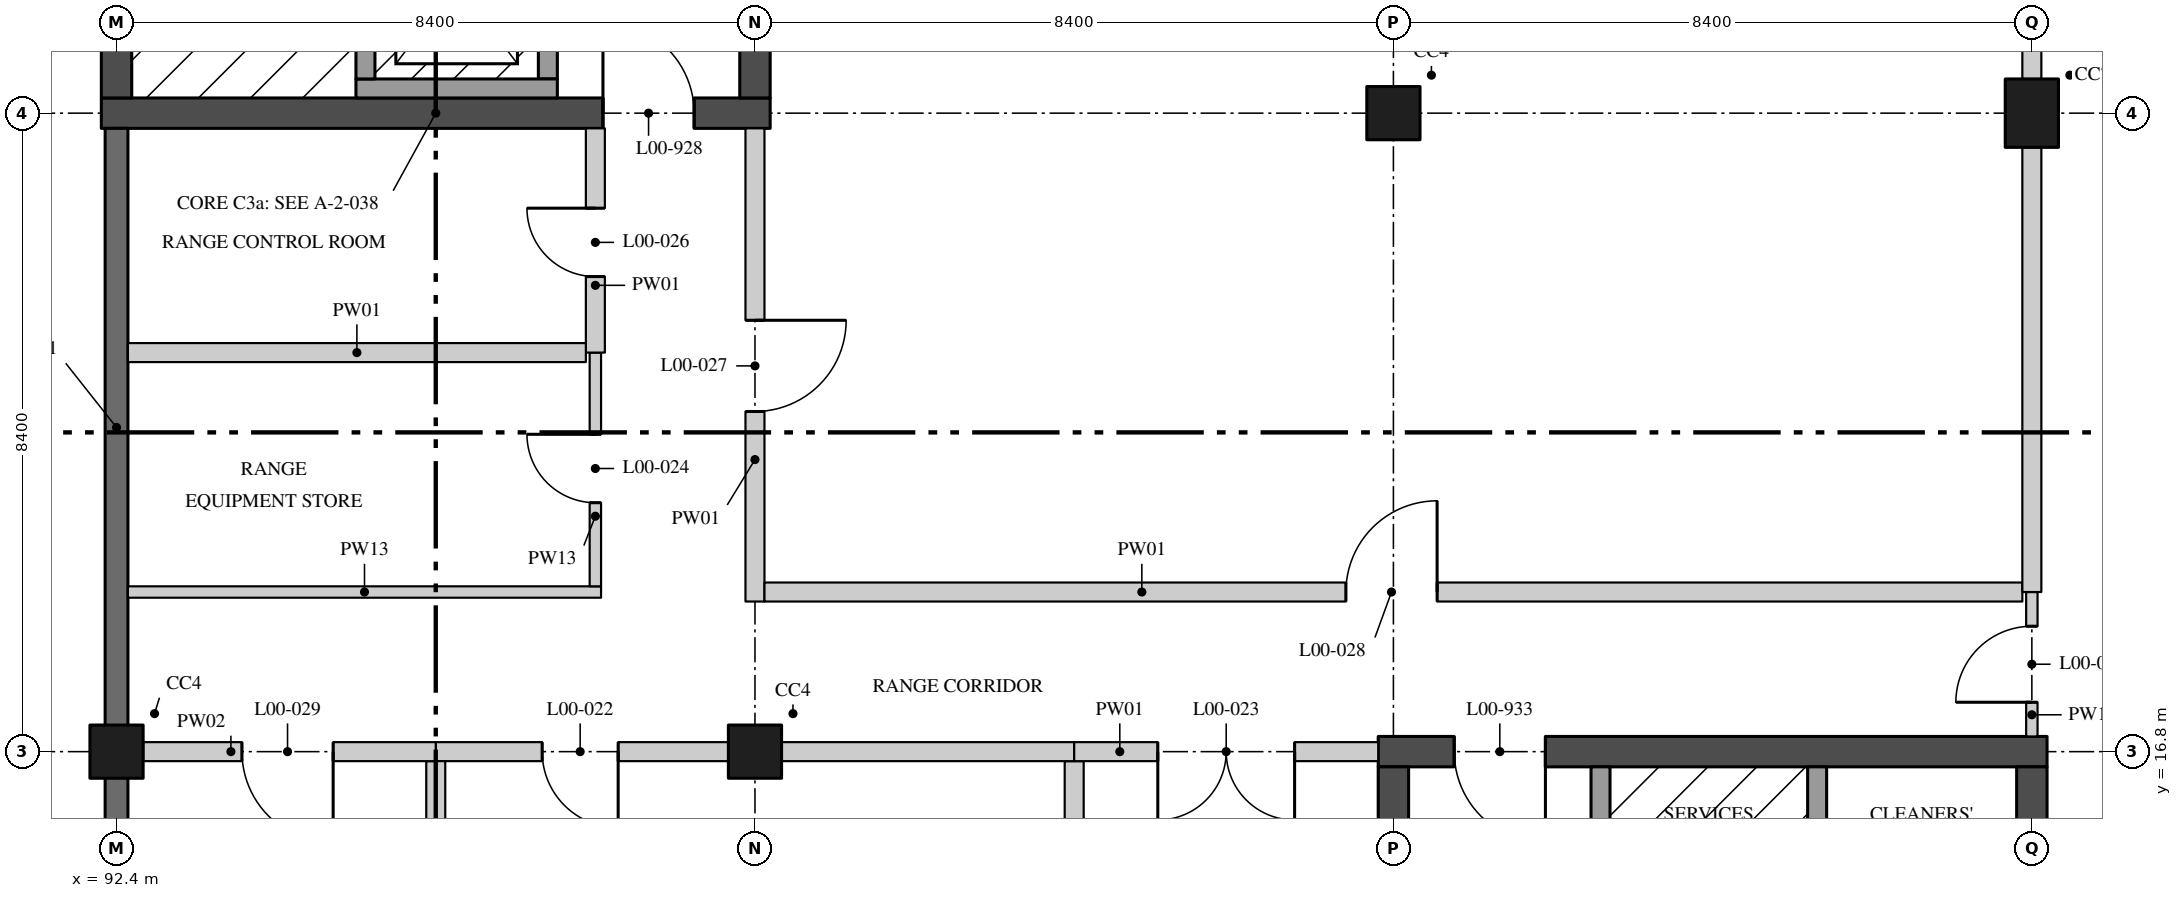
"""IFC4 building model, lengths in metres.
Left out: names, types, materials, properties, quantities, classifications, styles, units other than length and angle.
Written with IfcOpenShell. Run it as: python <this file> out.ifc"""

import sys

from ifc_helpers import new_model, si_unit, direction, frame, frame_2d, origin, origin_2d, place, context, subcontext, project, spatial, rectangle, extrude, element, fill, save


model = new_model("IFC4")
c1 = context("Model", 3, precision=1e-05, world=origin(), true_north=direction((0.0, 1.0)))
c2 = subcontext(c1, "Body", "Model", "MODEL_VIEW")
j1 = project(units=[si_unit("LENGTHUNIT", "METRE"), si_unit("PLANEANGLEUNIT", "RADIAN")], contexts=[c1])
p1 = place(None, origin())
s1 = spatial("IfcSite", under=j1, at=p1, CompositionType="ELEMENT")
p2 = place(p1, origin())
s2 = spatial("IfcBuilding", under=s1, at=p2, CompositionType="ELEMENT")
p3 = place(p2, origin())
s3 = spatial("IfcBuildingStorey", under=s2, at=p3, CompositionType="ELEMENT", Elevation=0.0)
for number, where, z_axis, x_axis in (
    (1, (92.4, 16.8, 0.0), (0.0, 0.0, 1.0), (1.0, 0.0, 0.0)),
    (2, (100.8, 16.8, 0.0), (0.0, 0.0, 1.0), (1.0, 0.0, 0.0)),
    (3, (109.2, 25.2, 0.0), (0.0, 0.0, 1.0), (1.0, 0.0, 0.0)),
):
    element("IfcColumn", number, at=place(p3, frame(where, z_axis=z_axis, x_axis=x_axis)), inside=s3, PredefinedType="COLUMN", context=c2, shape_type="SweptSolid", body=[
        extrude(rectangle(XDim=0.7, YDim=0.7, at=origin_2d()), origin(), (0.0, 0.0, 1.0), 5.05),
    ])
p4 = place(p3, frame((117.6, 25.2, 0.0), z_axis=(0.0, 0.0, 1.0), x_axis=(1.0, 0.0, 0.0)))
e4 = element("IfcColumn", 4, at=p4, inside=s3, PredefinedType="COLUMN", context=c2, shape_type="SweptSolid", body=[
    extrude(rectangle(XDim=0.7, YDim=0.9, at=origin_2d()), origin(), (0.0, 0.0, 1.0), 5.05),
])
p5 = place(p3, frame((92.2, 25.2, 0.0), z_axis=(0.0, 0.0, 1.0), x_axis=(1.0, 0.0, 0.0)))
e5 = element("IfcWall", 5, at=p5, inside=s3, PredefinedType="SHEAR", context=c2, shape_type="SweptSolid", body=[
    extrude(rectangle(XDim=8.8, YDim=0.4, at=frame_2d((4.4, 0.0))), origin(), (0.0, 0.0, 1.0), 5.05),
])
p6 = place(p5, frame((6.6, 0.0, 0.0)))
e6 = element("IfcOpeningElement", 6, at=p6, cuts=e5, PredefinedType="OPENING", context=c2, shape_type="SweptSolid", body=[
    extrude(rectangle(XDim=1.2, YDim=2.1, at=frame_2d((0.6, 1.05))), frame((0.0, 0.21, 0.0), z_axis=(0.0, -1.0, 0.0), x_axis=(1.0, 0.0, 0.0)), (0.0, 0.0, 1.0), 0.42),
])
for number, where, z_axis, x_axis in (
    (7, (92.4, 25.4, 0.0), (0.0, 0.0, 1.0), (0.0, 1.0, 0.0)),
    (8, (100.8, 25.4, 0.0), (0.0, 0.0, 1.0), (0.0, 1.0, 0.0)),
):
    element("IfcWall", number, at=place(p3, frame(where, z_axis=z_axis, x_axis=x_axis)), inside=s3, PredefinedType="SHEAR", context=c2, shape_type="SweptSolid", body=[
        extrude(rectangle(XDim=8.0, YDim=0.4, at=frame_2d((4.0, 0.0))), origin(), (0.0, 0.0, 1.0), 5.05),
    ])
p7 = place(p3, frame((109.0, 16.8, 0.0), z_axis=(0.0, 0.0, 1.0), x_axis=(1.0, 0.0, 0.0)))
e9 = element("IfcWall", 9, at=p7, inside=s3, PredefinedType="SHEAR", context=c2, shape_type="SweptSolid", body=[
    extrude(rectangle(XDim=8.8, YDim=0.4, at=frame_2d((4.4, 0.0))), origin(), (0.0, 0.0, 1.0), 5.05),
])
p8 = place(p7, frame((1.0, 0.0, 0.0)))
e10 = element("IfcOpeningElement", 10, at=p8, cuts=e9, PredefinedType="OPENING", context=c2, shape_type="SweptSolid", body=[
    extrude(rectangle(XDim=1.2, YDim=2.1, at=frame_2d((0.6, 1.05))), frame((0.0, 0.21, 0.0), z_axis=(0.0, -1.0, 0.0), x_axis=(1.0, 0.0, 0.0)), (0.0, 0.0, 1.0), 0.42),
])
for number, where, z_axis, x_axis in (
    (11, (109.2, 8.6, 0.0), (0.0, 0.0, 1.0), (0.0, 1.0, 0.0)),
    (12, (117.6, 8.6, 0.0), (0.0, 0.0, 1.0), (0.0, 1.0, 0.0)),
):
    element("IfcWall", number, at=place(p3, frame(where, z_axis=z_axis, x_axis=x_axis)), inside=s3, PredefinedType="SHEAR", context=c2, shape_type="SweptSolid", body=[
        extrude(rectangle(XDim=8.0, YDim=0.4, at=frame_2d((4.0, 0.0))), origin(), (0.0, 0.0, 1.0), 5.05),
    ])
p9 = place(p3, frame((111.925, 13.8, 0.0), z_axis=(0.0, 0.0, 1.0), x_axis=(0.0, 1.0, 0.0)))
e13 = element("IfcWall", 13, at=p9, inside=s3, PredefinedType="SOLIDWALL", context=c2, shape_type="SweptSolid", body=[
    extrude(rectangle(XDim=2.8, YDim=0.25, at=frame_2d((1.4, 0.0))), origin(), (0.0, 0.0, 1.0), 5.05),
])
p10 = place(p3, frame((114.775, 14.05, 0.0), z_axis=(0.0, 0.0, 1.0), x_axis=(0.0, 1.0, 0.0)))
e14 = element("IfcWall", 14, at=p10, inside=s3, PredefinedType="SOLIDWALL", context=c2, shape_type="SweptSolid", body=[
    extrude(rectangle(XDim=2.55, YDim=0.25, at=frame_2d((1.275, 0.0))), origin(), (0.0, 0.0, 1.0), 5.05),
])
p11 = place(p3, frame((98.075, 25.65, 0.0), z_axis=(0.0, 0.0, 1.0), x_axis=(0.0, 1.0, 0.0)))
e15 = element("IfcWall", 15, at=p11, inside=s3, PredefinedType="SOLIDWALL", context=c2, shape_type="SweptSolid", body=[
    extrude(rectangle(XDim=2.3, YDim=0.25, at=frame_2d((1.15, 0.0))), origin(), (0.0, 0.0, 1.0), 5.05),
])
p12 = place(p3, frame((95.55, 25.525, 0.0), z_axis=(0.0, 0.0, 1.0), x_axis=(1.0, 0.0, 0.0)))
e16 = element("IfcWall", 16, at=p12, inside=s3, PredefinedType="SOLIDWALL", context=c2, shape_type="SweptSolid", body=[
    extrude(rectangle(XDim=2.65, YDim=0.25, at=frame_2d((1.325, 0.0))), origin(), (0.0, 0.0, 1.0), 5.05),
])
p13 = place(p3, frame((95.675, 25.65, 0.0), z_axis=(0.0, 0.0, 1.0), x_axis=(0.0, 1.0, 0.0)))
e17 = element("IfcWall", 17, at=p13, inside=s3, PredefinedType="SOLIDWALL", context=c2, shape_type="SweptSolid", body=[
    extrude(rectangle(XDim=2.3, YDim=0.25, at=frame_2d((1.15, 0.0))), origin(), (0.0, 0.0, 1.0), 5.05),
])
p14 = place(p3, frame((105.0, 8.55, 0.0), z_axis=(0.0, 0.0, 1.0), x_axis=(0.0, 1.0, 0.0)))
e18 = element("IfcWall", 18, at=p14, inside=s3, PredefinedType="PARTITIONING", context=c2, shape_type="SweptSolid", body=[
    extrude(rectangle(XDim=8.125, YDim=0.25, at=frame_2d((4.062, 0.0))), origin(), (0.0, 0.0, 1.0), 5.05),
])
p15 = place(p3, frame((96.6, 16.8, 0.0), z_axis=(0.0, 0.0, 1.0), x_axis=(1.0, 0.0, 0.0)))
e19 = element("IfcWall", 19, at=p15, inside=s3, PredefinedType="PARTITIONING", context=c2, shape_type="SweptSolid", body=[
    extrude(rectangle(XDim=3.85, YDim=0.25, at=frame_2d((1.925, 0.0))), origin(), (0.0, 0.0, 1.0), 5.05),
])
p16 = place(p15, frame((1.4, 0.0, 0.0)))
e20 = element("IfcOpeningElement", 20, at=p16, cuts=e19, PredefinedType="OPENING", context=c2, shape_type="SweptSolid", body=[
    extrude(rectangle(XDim=1.0, YDim=2.1, at=frame_2d((0.5, 1.05))), frame((0.0, 0.135, 0.0), z_axis=(0.0, -1.0, 0.0), x_axis=(1.0, 0.0, 0.0)), (0.0, 0.0, 1.0), 0.27),
])
p17 = place(p3, frame((101.15, 16.8, 0.0), z_axis=(0.0, 0.0, 1.0), x_axis=(1.0, 0.0, 0.0)))
e21 = element("IfcWall", 21, at=p17, inside=s3, PredefinedType="PARTITIONING", context=c2, shape_type="SweptSolid", body=[
    extrude(rectangle(XDim=3.85, YDim=0.25, at=frame_2d((1.925, 0.0))), origin(), (0.0, 0.0, 1.0), 5.05),
])
p18 = place(p3, frame((96.6, 8.55, 0.0), z_axis=(0.0, 0.0, 1.0), x_axis=(0.0, 1.0, 0.0)))
e22 = element("IfcWall", 22, at=p18, inside=s3, PredefinedType="PARTITIONING", context=c2, shape_type="SweptSolid", body=[
    extrude(rectangle(XDim=8.125, YDim=0.25, at=frame_2d((4.062, 0.0))), origin(), (0.0, 0.0, 1.0), 5.05),
])
p19 = place(p3, frame((105.0, 16.8, 0.0), z_axis=(0.0, 0.0, 1.0), x_axis=(1.0, 0.0, 0.0)))
e23 = element("IfcWall", 23, at=p19, inside=s3, PredefinedType="PARTITIONING", context=c2, shape_type="SweptSolid", body=[
    extrude(rectangle(XDim=4.0, YDim=0.25, at=frame_2d((2.0, 0.0))), origin(), (0.0, 0.0, 1.0), 5.05),
])
p20 = place(p19, frame((1.1, 0.0, 0.0)))
e24 = element("IfcOpeningElement", 24, at=p20, cuts=e23, PredefinedType="OPENING", context=c2, shape_type="SweptSolid", body=[
    extrude(rectangle(XDim=1.8, YDim=2.7, at=frame_2d((0.9, 1.35))), frame((0.0, 0.135, 0.0), z_axis=(0.0, -1.0, 0.0), x_axis=(1.0, 0.0, 0.0)), (0.0, 0.0, 1.0), 0.27),
])
p21 = place(p3, frame((92.55, 18.9, 0.0), z_axis=(0.0, 0.0, 1.0), x_axis=(1.0, 0.0, 0.0)))
e25 = element("IfcWall", 25, at=p21, inside=s3, PredefinedType="PARTITIONING", context=c2, shape_type="SweptSolid", body=[
    extrude(rectangle(XDim=6.225, YDim=0.15, at=frame_2d((3.112, 0.0))), origin(), (0.0, 0.0, 1.0), 5.05),
])
p22 = place(p3, frame((98.7, 18.975, 0.0), z_axis=(0.0, 0.0, 1.0), x_axis=(0.0, 1.0, 0.0)))
e26 = element("IfcWall", 26, at=p22, inside=s3, PredefinedType="PARTITIONING", context=c2, shape_type="SweptSolid", body=[
    extrude(rectangle(XDim=3.075, YDim=0.15, at=frame_2d((1.538, 0.0))), origin(), (0.0, 0.0, 1.0), 5.05),
])
p23 = place(p22, frame((1.1, 0.0, 0.0)))
e27 = element("IfcOpeningElement", 27, at=p23, cuts=e26, PredefinedType="OPENING", context=c2, shape_type="SweptSolid", body=[
    extrude(rectangle(XDim=0.9, YDim=2.1, at=frame_2d((0.45, 1.05))), frame((0.0, 0.085, 0.0), z_axis=(0.0, -1.0, 0.0), x_axis=(1.0, 0.0, 0.0)), (0.0, 0.0, 1.0), 0.17),
])
p24 = place(p3, frame((117.6, 17.0, 0.0), z_axis=(0.0, 0.0, 1.0), x_axis=(0.0, 1.0, 0.0)))
e28 = element("IfcWall", 28, at=p24, inside=s3, PredefinedType="PARTITIONING", context=c2, shape_type="SweptSolid", body=[
    extrude(rectangle(XDim=1.9, YDim=0.15, at=frame_2d((0.95, 0.0))), origin(), (0.0, 0.0, 1.0), 8.375),
])
p25 = place(p24, frame((0.45, 0.0, 0.0)))
e29 = element("IfcOpeningElement", 29, at=p25, cuts=e28, PredefinedType="OPENING", context=c2, shape_type="SweptSolid", body=[
    extrude(rectangle(XDim=1.0, YDim=2.1, at=frame_2d((0.5, 1.05))), frame((0.0, 0.085, 0.0), z_axis=(0.0, -1.0, 0.0), x_axis=(1.0, 0.0, 0.0)), (0.0, 0.0, 1.0), 0.17),
])
p26 = place(p3, frame((98.7, 22.05, 0.0), z_axis=(0.0, 0.0, 1.0), x_axis=(0.0, 1.0, 0.0)))
e30 = element("IfcWall", 30, at=p26, inside=s3, PredefinedType="PARTITIONING", context=c2, shape_type="SweptSolid", body=[
    extrude(rectangle(XDim=2.95, YDim=0.25, at=frame_2d((1.475, 0.0))), origin(), (0.0, 0.0, 1.0), 5.05),
])
p27 = place(p26, frame((1.0, 0.0, 0.0)))
e31 = element("IfcOpeningElement", 31, at=p27, cuts=e30, PredefinedType="OPENING", context=c2, shape_type="SweptSolid", body=[
    extrude(rectangle(XDim=0.9, YDim=2.1, at=frame_2d((0.45, 1.05))), frame((0.0, 0.135, 0.0), z_axis=(0.0, -1.0, 0.0), x_axis=(1.0, 0.0, 0.0)), (0.0, 0.0, 1.0), 0.27),
])
p28 = place(p3, frame((100.8, 18.775, 0.0), z_axis=(0.0, 0.0, 1.0), x_axis=(0.0, 1.0, 0.0)))
e32 = element("IfcWall", 32, at=p28, inside=s3, PredefinedType="PARTITIONING", context=c2, shape_type="SweptSolid", body=[
    extrude(rectangle(XDim=6.225, YDim=0.25, at=frame_2d((3.113, 0.0))), origin(), (0.0, 0.0, 1.0), 5.05),
])
p29 = place(p28, frame((2.5, 0.0, 0.0)))
e33 = element("IfcOpeningElement", 33, at=p29, cuts=e32, PredefinedType="OPENING", context=c2, shape_type="SweptSolid", body=[
    extrude(rectangle(XDim=1.2, YDim=2.1, at=frame_2d((0.6, 1.05))), frame((0.0, 0.135, 0.0), z_axis=(0.0, -1.0, 0.0), x_axis=(1.0, 0.0, 0.0)), (0.0, 0.0, 1.0), 0.27),
])
p30 = place(p3, frame((100.925, 18.9, 0.0), z_axis=(0.0, 0.0, 1.0), x_axis=(1.0, 0.0, 0.0)))
e34 = element("IfcWall", 34, at=p30, inside=s3, PredefinedType="PARTITIONING", context=c2, shape_type="SweptSolid", body=[
    extrude(rectangle(XDim=16.55, YDim=0.25, at=frame_2d((8.275, 0.0))), origin(), (0.0, 0.0, 1.0), 5.05),
])
p31 = place(p30, frame((7.65, 0.0, 0.0)))
e35 = element("IfcOpeningElement", 35, at=p31, cuts=e34, PredefinedType="OPENING", context=c2, shape_type="SweptSolid", body=[
    extrude(rectangle(XDim=1.2, YDim=2.1, at=frame_2d((0.6, 1.05))), frame((0.0, 0.135, 0.0), z_axis=(0.0, -1.0, 0.0), x_axis=(1.0, 0.0, 0.0)), (0.0, 0.0, 1.0), 0.27),
])
p32 = place(p3, frame((92.75, 16.8, 0.0), z_axis=(0.0, 0.0, 1.0), x_axis=(1.0, 0.0, 0.0)))
e36 = element("IfcWall", 36, at=p32, inside=s3, PredefinedType="PARTITIONING", context=c2, shape_type="SweptSolid", body=[
    extrude(rectangle(XDim=3.85, YDim=0.25, at=frame_2d((1.925, 0.0))), origin(), (0.0, 0.0, 1.0), 5.05),
])
p33 = place(p32, frame((1.3, 0.0, 0.0)))
e37 = element("IfcOpeningElement", 37, at=p33, cuts=e36, PredefinedType="OPENING", context=c2, shape_type="SweptSolid", body=[
    extrude(rectangle(XDim=1.2, YDim=2.4, at=frame_2d((0.6, 1.2))), frame((0.0, 0.135, 0.0), z_axis=(0.0, -1.0, 0.0), x_axis=(1.0, 0.0, 0.0)), (0.0, 0.0, 1.0), 0.27),
])
p34 = place(p3, frame((92.55, 22.05, 0.0), z_axis=(0.0, 0.0, 1.0), x_axis=(1.0, 0.0, 0.0)))
e38 = element("IfcWall", 38, at=p34, inside=s3, PredefinedType="PARTITIONING", context=c2, shape_type="SweptSolid", body=[
    extrude(rectangle(XDim=6.025, YDim=0.25, at=frame_2d((3.012, 0.0))), origin(), (0.0, 0.0, 1.0), 5.05),
])
p35 = place(p3, frame((117.6, 18.9, 0.0), z_axis=(0.0, 0.0, 1.0), x_axis=(0.0, 1.0, 0.0)))
e39 = element("IfcWall", 39, at=p35, inside=s3, PredefinedType="PARTITIONING", context=c2, shape_type="SweptSolid", body=[
    extrude(rectangle(XDim=5.85, YDim=0.25, at=frame_2d((2.925, 0.0))), origin(), (0.0, 0.0, 1.0), 8.375),
])
p36 = place(p3, frame((117.6, 25.65, 0.0), z_axis=(0.0, 0.0, 1.0), x_axis=(0.0, 1.0, 0.0)))
e40 = element("IfcWall", 40, at=p36, inside=s3, PredefinedType="PARTITIONING", context=c2, shape_type="SweptSolid", body=[
    extrude(rectangle(XDim=7.75, YDim=0.25, at=frame_2d((3.875, 0.0))), origin(), (0.0, 0.0, 1.0), 8.375),
])
p37 = place(p3, frame((92.4, 25.0, 0.0), z_axis=(0.0, 0.0, 1.0), x_axis=(0.0, -1.0, 0.0)))
e41 = element("IfcWall", 41, at=p37, inside=s3, PredefinedType="SOLIDWALL", context=c2, shape_type="SweptSolid", body=[
    extrude(rectangle(XDim=7.87, YDim=0.3, at=frame_2d((3.935, 0.0))), origin(), (0.0, 0.0, 1.0), 5.05),
])
p38 = place(p3, frame((92.4, 16.47, 0.0), z_axis=(0.0, 0.0, 1.0), x_axis=(0.0, -1.0, 0.0)))
e42 = element("IfcWall", 42, at=p38, inside=s3, PredefinedType="SOLIDWALL", context=c2, shape_type="SweptSolid", body=[
    extrude(rectangle(XDim=7.74, YDim=0.3, at=frame_2d((3.87, 0.0))), origin(), (0.0, 0.0, 1.0), 5.05),
])
p39 = place(p38, frame((0.57, 0.0, 0.6)))
e43 = element("IfcOpeningElement", 43, at=p39, cuts=e42, PredefinedType="OPENING", context=c2, shape_type="SweptSolid", body=[
    extrude(rectangle(XDim=2.4, YDim=2.1, at=frame_2d((1.2, 1.05))), frame((0.0, 0.16, 0.0), z_axis=(0.0, -1.0, 0.0), x_axis=(1.0, 0.0, 0.0)), (0.0, 0.0, 1.0), 0.32),
])
p40 = place(p6, origin())
e44 = element("IfcDoor", 44, at=p40, inside=s3, OperationType="SINGLE_SWING_RIGHT", PredefinedType="DOOR", context=c2, shape_type="SweptSolid", body=[
    extrude(rectangle(XDim=1.2, YDim=2.1, at=frame_2d((0.6, 1.05))), frame((0.0, 0.035, 0.0), z_axis=(0.0, -1.0, 0.0), x_axis=(1.0, 0.0, 0.0)), (0.0, 0.0, 1.0), 0.07),
])
fill(e6, e44)
p41 = place(p8, frame((1.2, 0.0, 0.0), z_axis=(0.0, 0.0, 1.0), x_axis=(-1.0, 0.0, 0.0)))
e45 = element("IfcDoor", 45, at=p41, inside=s3, OperationType="SINGLE_SWING_RIGHT", PredefinedType="DOOR", context=c2, shape_type="SweptSolid", body=[
    extrude(rectangle(XDim=1.2, YDim=2.1, at=frame_2d((0.6, 1.05))), frame((0.0, 0.035, 0.0), z_axis=(0.0, -1.0, 0.0), x_axis=(1.0, 0.0, 0.0)), (0.0, 0.0, 1.0), 0.07),
])
fill(e10, e45)
p42 = place(p16, frame((1.0, 0.0, 0.0), z_axis=(0.0, 0.0, 1.0), x_axis=(-1.0, 0.0, 0.0)))
e46 = element("IfcDoor", 46, at=p42, inside=s3, OperationType="SINGLE_SWING_RIGHT", PredefinedType="DOOR", context=c2, shape_type="SweptSolid", body=[
    extrude(rectangle(XDim=1.0, YDim=2.1, at=frame_2d((0.5, 1.05))), frame((0.0, 0.06, 0.0), z_axis=(0.0, -1.0, 0.0), x_axis=(1.0, 0.0, 0.0)), (0.0, 0.0, 1.0), 0.12),
])
fill(e20, e46)
p43 = place(p20, frame((1.8, 0.0, 0.0), z_axis=(0.0, 0.0, 1.0), x_axis=(-1.0, 0.0, 0.0)))
e47 = element("IfcDoor", 47, at=p43, inside=s3, OperationType="DOUBLE_DOOR_SINGLE_SWING", PredefinedType="DOOR", context=c2, shape_type="SweptSolid", body=[
    extrude(rectangle(XDim=1.8, YDim=2.7, at=frame_2d((0.9, 1.35))), frame((0.0, 0.05, 0.0), z_axis=(0.0, -1.0, 0.0), x_axis=(1.0, 0.0, 0.0)), (0.0, 0.0, 1.0), 0.1),
])
fill(e24, e47)
p44 = place(p23, origin())
e48 = element("IfcDoor", 48, at=p44, inside=s3, OperationType="SINGLE_SWING_LEFT", PredefinedType="DOOR", context=c2, shape_type="SweptSolid", body=[
    extrude(rectangle(XDim=0.9, YDim=2.1, at=frame_2d((0.45, 1.05))), frame((0.0, 0.025, 0.0), z_axis=(0.0, -1.0, 0.0), x_axis=(1.0, 0.0, 0.0)), (0.0, 0.0, 1.0), 0.05),
])
fill(e27, e48)
p45 = place(p25, origin())
e49 = element("IfcDoor", 49, at=p45, inside=s3, OperationType="SINGLE_SWING_RIGHT", PredefinedType="DOOR", context=c2, shape_type="SweptSolid", body=[
    extrude(rectangle(XDim=1.0, YDim=2.1, at=frame_2d((0.5, 1.05))), frame((0.0, 0.025, 0.0), z_axis=(0.0, -1.0, 0.0), x_axis=(1.0, 0.0, 0.0)), (0.0, 0.0, 1.0), 0.05),
])
fill(e29, e49)
p46 = place(p27, origin())
e50 = element("IfcDoor", 50, at=p46, inside=s3, OperationType="SINGLE_SWING_LEFT", PredefinedType="DOOR", context=c2, shape_type="SweptSolid", body=[
    extrude(rectangle(XDim=0.9, YDim=2.1, at=frame_2d((0.45, 1.05))), frame((0.0, 0.05, 0.0), z_axis=(0.0, -1.0, 0.0), x_axis=(1.0, 0.0, 0.0)), (0.0, 0.0, 1.0), 0.1),
])
fill(e31, e50)
p47 = place(p29, frame((1.2, 0.0, 0.0), z_axis=(0.0, 0.0, 1.0), x_axis=(-1.0, 0.0, 0.0)))
e51 = element("IfcDoor", 51, at=p47, inside=s3, OperationType="SINGLE_SWING_RIGHT", PredefinedType="DOOR", context=c2, shape_type="SweptSolid", body=[
    extrude(rectangle(XDim=1.2, YDim=2.1, at=frame_2d((0.6, 1.05))), frame((0.0, 0.045, 0.0), z_axis=(0.0, -1.0, 0.0), x_axis=(1.0, 0.0, 0.0)), (0.0, 0.0, 1.0), 0.09),
])
fill(e33, e51)
p48 = place(p31, origin())
e52 = element("IfcDoor", 52, at=p48, inside=s3, OperationType="SINGLE_SWING_LEFT", PredefinedType="DOOR", context=c2, shape_type="SweptSolid", body=[
    extrude(rectangle(XDim=1.2, YDim=2.1, at=frame_2d((0.6, 1.05))), frame((0.0, 0.045, 0.0), z_axis=(0.0, -1.0, 0.0), x_axis=(1.0, 0.0, 0.0)), (0.0, 0.0, 1.0), 0.09),
])
fill(e35, e52)
p49 = place(p33, frame((1.2, 0.0, 0.0), z_axis=(0.0, 0.0, 1.0), x_axis=(-1.0, 0.0, 0.0)))
e53 = element("IfcDoor", 53, at=p49, inside=s3, OperationType="SINGLE_SWING_RIGHT", PredefinedType="DOOR", context=c2, shape_type="SweptSolid", body=[
    extrude(rectangle(XDim=1.2, YDim=2.4, at=frame_2d((0.6, 1.2))), frame((0.0, 0.05, 0.0), z_axis=(0.0, -1.0, 0.0), x_axis=(1.0, 0.0, 0.0)), (0.0, 0.0, 1.0), 0.1),
])
fill(e37, e53)
save(model, sys.argv[1])
